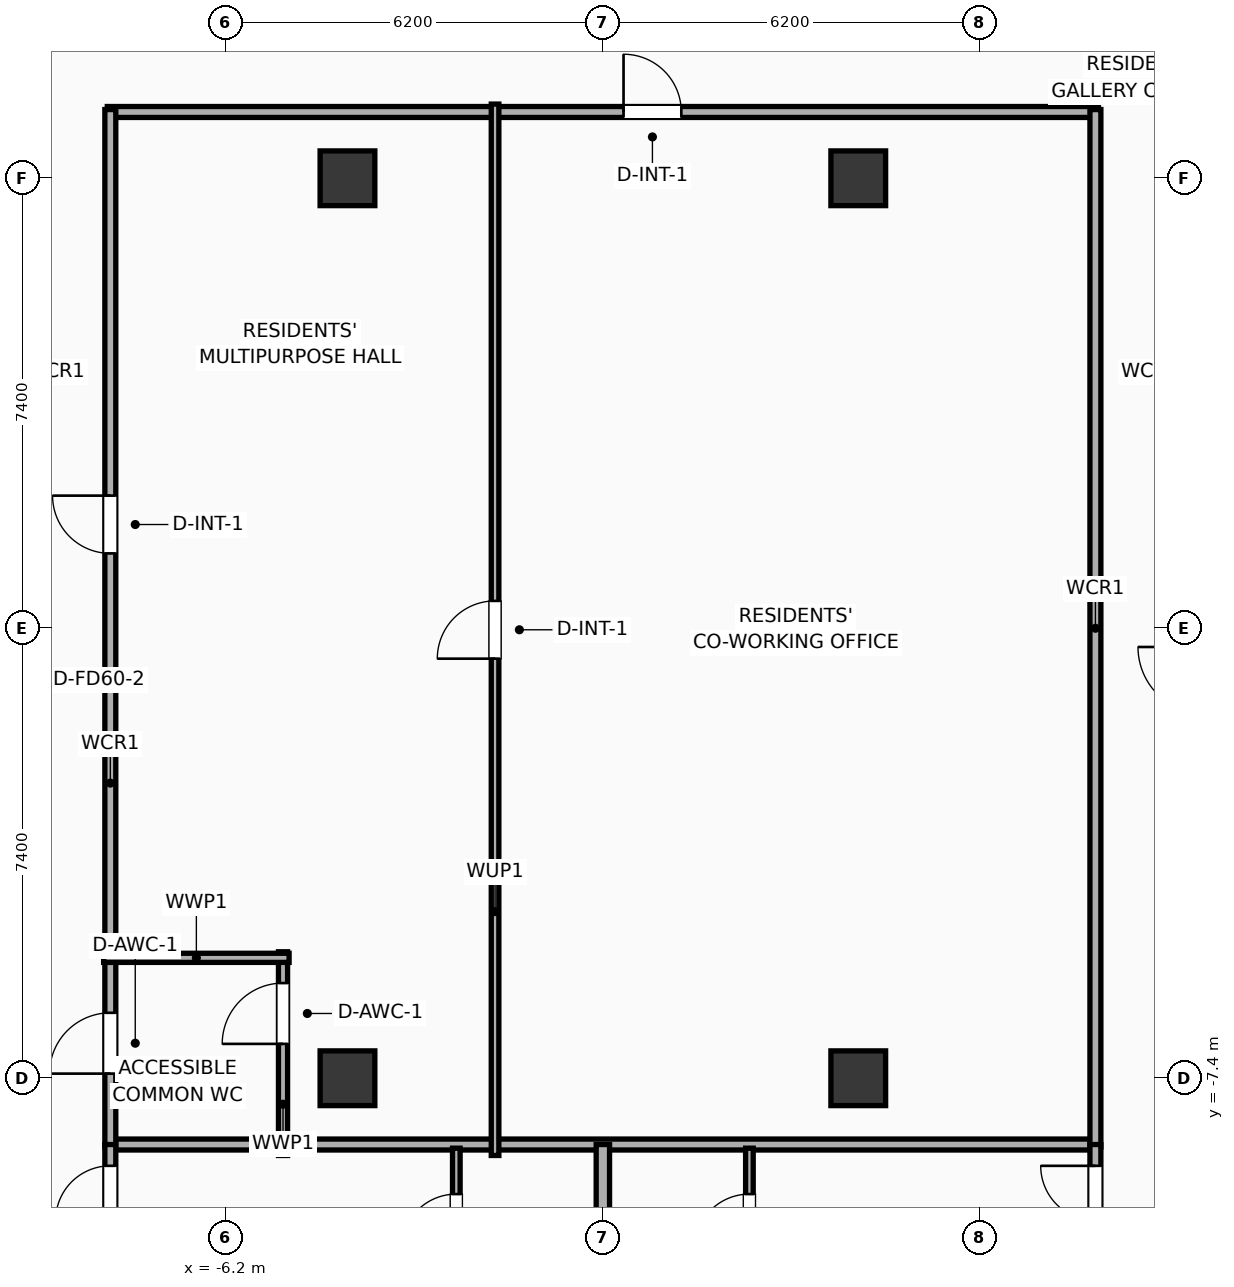
"""IFC4 building model, lengths in metres.
Left out: names, types, materials, properties, quantities, classifications, styles, units other than length and angle.
Written with IfcOpenShell. Run it as: python <this file> out.ifc"""

import sys

from ifc_helpers import new_model, si_unit, direction, frame, frame_2d, origin, origin_2d, place, context, subcontext, project, spatial, rectangle, extrude, element, fill, save


model = new_model("IFC4")
c1 = context("Model", 3, precision=1e-05, world=origin(), true_north=direction((0.0, 1.0)))
c2 = subcontext(c1, "Body", "Model", "MODEL_VIEW")
j1 = project(units=[si_unit("LENGTHUNIT", "METRE"), si_unit("PLANEANGLEUNIT", "RADIAN")], contexts=[c1])
p1 = place(None, origin())
s1 = spatial("IfcSite", under=j1, at=p1, CompositionType="ELEMENT")
p2 = place(p1, origin())
s2 = spatial("IfcBuilding", under=s1, at=p2, CompositionType="ELEMENT")
p3 = place(p2, frame((0.0, 0.0, 299.0)))
s3 = spatial("IfcBuildingStorey", under=s2, at=p3, CompositionType="ELEMENT", Elevation=299.0)
for number, where, z_axis, x_axis in (
    (1, (-4.2, -7.4, 0.0), (0.0, 0.0, 1.0), (1.0, 0.0, 0.0)),
    (2, (-4.2, 7.4, 0.0), (0.0, 0.0, 1.0), (1.0, 0.0, 0.0)),
    (3, (4.2, -7.4, 0.0), (0.0, 0.0, 1.0), (1.0, 0.0, 0.0)),
    (4, (4.2, 7.4, 0.0), (0.0, 0.0, 1.0), (1.0, 0.0, 0.0)),
):
    element("IfcColumn", number, at=place(p3, frame(where, z_axis=z_axis, x_axis=x_axis)), inside=s3, PredefinedType="COLUMN", context=c2, shape_type="SweptSolid", body=[
        extrude(rectangle(XDim=0.9, YDim=0.9, at=origin_2d()), origin(), (0.0, 0.0, 1.0), 3.9),
    ])
p4 = place(p3, frame((-8.15, 8.49, 0.0), z_axis=(0.0, 0.0, 1.0), x_axis=(1.0, 0.0, 0.0)))
e5 = element("IfcWall", 5, at=p4, inside=s3, PredefinedType="PARTITIONING", context=c2, shape_type="SweptSolid", body=[
    extrude(rectangle(XDim=16.3, YDim=0.18, at=frame_2d((8.15, 0.0))), origin(), (0.0, 0.0, 1.0), 3.635),
])
p5 = place(p4, frame((8.49, 0.0, 0.0)))
e6 = element("IfcOpeningElement", 6, at=p5, cuts=e5, PredefinedType="OPENING", context=c2, shape_type="SweptSolid", body=[
    extrude(rectangle(XDim=0.95, YDim=2.05, at=frame_2d((0.475, 1.025))), frame((0.0, 0.1, 0.0), z_axis=(0.0, -1.0, 0.0), x_axis=(1.0, 0.0, 0.0)), (0.0, 0.0, 1.0), 0.2),
])
p6 = place(p3, frame((-8.15, -8.49, 0.0), z_axis=(0.0, 0.0, 1.0), x_axis=(1.0, 0.0, 0.0)))
e7 = element("IfcWall", 7, at=p6, inside=s3, PredefinedType="PARTITIONING", context=c2, shape_type="SweptSolid", body=[
    extrude(rectangle(XDim=16.3, YDim=0.18, at=frame_2d((8.15, 0.0))), origin(), (0.0, 0.0, 1.0), 3.635),
])
p7 = place(p3, frame((-8.1, -8.53, 0.0), z_axis=(0.0, 0.0, 1.0), x_axis=(0.0, 1.0, 0.0)))
e8 = element("IfcWall", 8, at=p7, inside=s3, PredefinedType="PARTITIONING", context=c2, shape_type="SweptSolid", body=[
    extrude(rectangle(XDim=17.06, YDim=0.18, at=frame_2d((8.53, 0.0))), origin(), (0.0, 0.0, 1.0), 3.635),
])
p8 = place(p7, frame((1.206, 0.0, 0.0)))
e9 = element("IfcOpeningElement", 9, at=p8, cuts=e8, PredefinedType="OPENING", context=c2, shape_type="SweptSolid", body=[
    extrude(rectangle(XDim=1.0, YDim=2.05, at=frame_2d((0.5, 1.025))), frame((0.0, 0.1, 0.0), z_axis=(0.0, -1.0, 0.0), x_axis=(1.0, 0.0, 0.0)), (0.0, 0.0, 1.0), 0.2),
])
p9 = place(p7, frame((9.761, 0.0, 0.0)))
e10 = element("IfcOpeningElement", 10, at=p9, cuts=e8, PredefinedType="OPENING", context=c2, shape_type="SweptSolid", body=[
    extrude(rectangle(XDim=0.95, YDim=2.05, at=frame_2d((0.475, 1.025))), frame((0.0, 0.1, 0.0), z_axis=(0.0, -1.0, 0.0), x_axis=(1.0, 0.0, 0.0)), (0.0, 0.0, 1.0), 0.2),
])
p10 = place(p3, frame((8.1, -8.53, 0.0), z_axis=(0.0, 0.0, 1.0), x_axis=(0.0, 1.0, 0.0)))
e11 = element("IfcWall", 11, at=p10, inside=s3, PredefinedType="PARTITIONING", context=c2, shape_type="SweptSolid", body=[
    extrude(rectangle(XDim=17.06, YDim=0.18, at=frame_2d((8.53, 0.0))), origin(), (0.0, 0.0, 1.0), 3.635),
])
p11 = place(p3, frame((-5.26, -8.67, 0.0), z_axis=(0.0, 0.0, 1.0), x_axis=(0.0, 1.0, 0.0)))
e12 = element("IfcWall", 12, at=p11, inside=s3, PredefinedType="PLUMBINGWALL", context=c2, shape_type="SweptSolid", body=[
    extrude(rectangle(XDim=3.35, YDim=0.15, at=frame_2d((1.675, 0.0))), origin(), (0.0, 0.0, 1.0), 3.635),
])
p12 = place(p11, frame((1.835, 0.0, 0.0)))
e13 = element("IfcOpeningElement", 13, at=p12, cuts=e12, PredefinedType="OPENING", context=c2, shape_type="SweptSolid", body=[
    extrude(rectangle(XDim=1.0, YDim=2.05, at=frame_2d((0.5, 1.025))), frame((0.0, 0.085, 0.0), z_axis=(0.0, -1.0, 0.0), x_axis=(1.0, 0.0, 0.0)), (0.0, 0.0, 1.0), 0.17),
])
p13 = place(p3, frame((-8.21, -5.42, 0.0), z_axis=(0.0, 0.0, 1.0), x_axis=(1.0, 0.0, 0.0)))
e14 = element("IfcWall", 14, at=p13, inside=s3, PredefinedType="PLUMBINGWALL", context=c2, shape_type="SweptSolid", body=[
    extrude(rectangle(XDim=3.05, YDim=0.15, at=frame_2d((1.525, 0.0))), origin(), (0.0, 0.0, 1.0), 3.635),
])
p14 = place(p3, frame((-1.773, -8.67, 0.0), z_axis=(0.0, 0.0, 1.0), x_axis=(0.0, 1.0, 0.0)))
e15 = element("IfcWall", 15, at=p14, inside=s3, PredefinedType="PARTITIONING", context=c2, shape_type="SweptSolid", body=[
    extrude(rectangle(XDim=17.29, YDim=0.125, at=frame_2d((8.645, 0.0))), origin(), (0.0, 0.0, 1.0), 3.635),
])
p15 = place(p14, frame((8.17, 0.0, 0.0)))
e16 = element("IfcOpeningElement", 16, at=p15, cuts=e15, PredefinedType="OPENING", context=c2, shape_type="SweptSolid", body=[
    extrude(rectangle(XDim=0.95, YDim=2.05, at=frame_2d((0.475, 1.025))), frame((0.0, 0.073, 0.0), z_axis=(0.0, -1.0, 0.0), x_axis=(1.0, 0.0, 0.0)), (0.0, 0.0, 1.0), 0.145),
])
p16 = place(p3, frame((-2.41, -10.96, 0.0), z_axis=(0.0, 0.0, 1.0), x_axis=(0.0, 1.0, 0.0)))
e17 = element("IfcWall", 17, at=p16, inside=s3, PredefinedType="PARTITIONING", context=c2, shape_type="SweptSolid", body=[
    extrude(rectangle(XDim=2.41, YDim=0.125, at=frame_2d((1.205, 0.0))), origin(), (0.0, 0.0, 1.0), 3.635),
])
p17 = place(p16, frame((0.755, 0.0, 0.0)))
e18 = element("IfcOpeningElement", 18, at=p17, cuts=e17, PredefinedType="OPENING", context=c2, shape_type="SweptSolid", body=[
    extrude(rectangle(XDim=0.9, YDim=2.05, at=frame_2d((0.45, 1.025))), frame((0.0, 0.073, 0.0), z_axis=(0.0, -1.0, 0.0), x_axis=(1.0, 0.0, 0.0)), (0.0, 0.0, 1.0), 0.145),
])
p18 = place(p3, frame((-8.1, -18.155, 0.0), z_axis=(0.0, 0.0, 1.0), x_axis=(0.0, 1.0, 0.0)))
e19 = element("IfcWall", 19, at=p18, inside=s3, PredefinedType="PARTITIONING", context=c2, shape_type="SweptSolid", body=[
    extrude(rectangle(XDim=9.665, YDim=0.18, at=frame_2d((4.832, 0.0))), origin(), (0.0, 0.0, 1.0), 3.635),
])
p19 = place(p18, frame((8.414, 0.0, 0.0)))
e20 = element("IfcOpeningElement", 20, at=p19, cuts=e19, PredefinedType="OPENING", context=c2, shape_type="SweptSolid", body=[
    extrude(rectangle(XDim=0.9, YDim=2.05, at=frame_2d((0.45, 1.025))), frame((0.0, 0.1, 0.0), z_axis=(0.0, -1.0, 0.0), x_axis=(1.0, 0.0, 0.0)), (0.0, 0.0, 1.0), 0.2),
])
p20 = place(p3, frame((2.41, -10.96, 0.0), z_axis=(0.0, 0.0, 1.0), x_axis=(0.0, 1.0, 0.0)))
e21 = element("IfcWall", 21, at=p20, inside=s3, PredefinedType="PARTITIONING", context=c2, shape_type="SweptSolid", body=[
    extrude(rectangle(XDim=2.41, YDim=0.125, at=frame_2d((1.205, 0.0))), origin(), (0.0, 0.0, 1.0), 3.635),
])
p21 = place(p20, frame((0.755, 0.0, 0.0)))
e22 = element("IfcOpeningElement", 22, at=p21, cuts=e21, PredefinedType="OPENING", context=c2, shape_type="SweptSolid", body=[
    extrude(rectangle(XDim=0.9, YDim=2.05, at=frame_2d((0.45, 1.025))), frame((0.0, 0.073, 0.0), z_axis=(0.0, -1.0, 0.0), x_axis=(1.0, 0.0, 0.0)), (0.0, 0.0, 1.0), 0.145),
])
p22 = place(p3, frame((8.1, -19.857, 0.0), z_axis=(0.0, 0.0, 1.0), x_axis=(0.0, 1.0, 0.0)))
e23 = element("IfcWall", 23, at=p22, inside=s3, PredefinedType="PARTITIONING", context=c2, shape_type="SweptSolid", body=[
    extrude(rectangle(XDim=11.367, YDim=0.18, at=frame_2d((5.684, 0.0))), origin(), (0.0, 0.0, 1.0), 3.635),
])
p23 = place(p22, frame((10.117, 0.0, 0.0)))
e24 = element("IfcOpeningElement", 24, at=p23, cuts=e23, PredefinedType="OPENING", context=c2, shape_type="SweptSolid", body=[
    extrude(rectangle(XDim=0.9, YDim=2.05, at=frame_2d((0.45, 1.025))), frame((0.0, 0.1, 0.0), z_axis=(0.0, -1.0, 0.0), x_axis=(1.0, 0.0, 0.0)), (0.0, 0.0, 1.0), 0.2),
])
p24 = place(p3, frame((0.0, -19.006, 0.0), z_axis=(0.0, 0.0, 1.0), x_axis=(0.0, 1.0, 0.0)))
e25 = element("IfcWall", 25, at=p24, inside=s3, PredefinedType="PARTITIONING", context=c2, shape_type="SweptSolid", body=[
    extrude(rectangle(XDim=10.516, YDim=0.22, at=frame_2d((5.258, 0.0))), origin(), (0.0, 0.0, 1.0), 3.635),
])
p25 = place(p5, origin())
e26 = element("IfcDoor", 26, at=p25, inside=s3, OperationType="SINGLE_SWING_LEFT", PredefinedType="DOOR", context=c2, shape_type="SweptSolid", body=[
    extrude(rectangle(XDim=0.95, YDim=2.05, at=frame_2d((0.475, 1.025))), frame((0.0, 0.025, 0.0), z_axis=(0.0, -1.0, 0.0), x_axis=(1.0, 0.0, 0.0)), (0.0, 0.0, 1.0), 0.05),
])
fill(e6, e26)
p26 = place(p8, origin())
e27 = element("IfcDoor", 27, at=p26, inside=s3, OperationType="SINGLE_SWING_LEFT", PredefinedType="DOOR", context=c2, shape_type="SweptSolid", body=[
    extrude(rectangle(XDim=1.0, YDim=2.05, at=frame_2d((0.5, 1.025))), frame((0.0, 0.025, 0.0), z_axis=(0.0, -1.0, 0.0), x_axis=(1.0, 0.0, 0.0)), (0.0, 0.0, 1.0), 0.05),
])
fill(e9, e27)
p27 = place(p9, origin())
e28 = element("IfcDoor", 28, at=p27, inside=s3, OperationType="SINGLE_SWING_RIGHT", PredefinedType="DOOR", context=c2, shape_type="SweptSolid", body=[
    extrude(rectangle(XDim=0.95, YDim=2.05, at=frame_2d((0.475, 1.025))), frame((0.0, 0.025, 0.0), z_axis=(0.0, -1.0, 0.0), x_axis=(1.0, 0.0, 0.0)), (0.0, 0.0, 1.0), 0.05),
])
fill(e10, e28)
p28 = place(p12, origin())
e29 = element("IfcDoor", 29, at=p28, inside=s3, OperationType="SINGLE_SWING_LEFT", PredefinedType="DOOR", context=c2, shape_type="SweptSolid", body=[
    extrude(rectangle(XDim=1.0, YDim=2.05, at=frame_2d((0.5, 1.025))), frame((0.0, 0.025, 0.0), z_axis=(0.0, -1.0, 0.0), x_axis=(1.0, 0.0, 0.0)), (0.0, 0.0, 1.0), 0.05),
])
fill(e13, e29)
p29 = place(p15, origin())
e30 = element("IfcDoor", 30, at=p29, inside=s3, OperationType="SINGLE_SWING_LEFT", PredefinedType="DOOR", context=c2, shape_type="SweptSolid", body=[
    extrude(rectangle(XDim=0.95, YDim=2.05, at=frame_2d((0.475, 1.025))), frame((0.0, 0.025, 0.0), z_axis=(0.0, -1.0, 0.0), x_axis=(1.0, 0.0, 0.0)), (0.0, 0.0, 1.0), 0.05),
])
fill(e16, e30)
p30 = place(p17, origin())
e31 = element("IfcDoor", 31, at=p30, inside=s3, OperationType="SINGLE_SWING_LEFT", PredefinedType="DOOR", context=c2, shape_type="SweptSolid", body=[
    extrude(rectangle(XDim=0.9, YDim=2.05, at=frame_2d((0.45, 1.025))), frame((0.0, 0.025, 0.0), z_axis=(0.0, -1.0, 0.0), x_axis=(1.0, 0.0, 0.0)), (0.0, 0.0, 1.0), 0.05),
])
fill(e18, e31)
p31 = place(p19, origin())
e32 = element("IfcDoor", 32, at=p31, inside=s3, OperationType="SINGLE_SWING_LEFT", PredefinedType="DOOR", context=c2, shape_type="SweptSolid", body=[
    extrude(rectangle(XDim=0.9, YDim=2.05, at=frame_2d((0.45, 1.025))), frame((0.0, 0.025, 0.0), z_axis=(0.0, -1.0, 0.0), x_axis=(1.0, 0.0, 0.0)), (0.0, 0.0, 1.0), 0.05),
])
fill(e20, e32)
p32 = place(p21, origin())
e33 = element("IfcDoor", 33, at=p32, inside=s3, OperationType="SINGLE_SWING_LEFT", PredefinedType="DOOR", context=c2, shape_type="SweptSolid", body=[
    extrude(rectangle(XDim=0.9, YDim=2.05, at=frame_2d((0.45, 1.025))), frame((0.0, 0.025, 0.0), z_axis=(0.0, -1.0, 0.0), x_axis=(1.0, 0.0, 0.0)), (0.0, 0.0, 1.0), 0.05),
])
fill(e22, e33)
p33 = place(p23, origin())
e34 = element("IfcDoor", 34, at=p33, inside=s3, OperationType="SINGLE_SWING_RIGHT", PredefinedType="DOOR", context=c2, shape_type="SweptSolid", body=[
    extrude(rectangle(XDim=0.9, YDim=2.05, at=frame_2d((0.45, 1.025))), frame((0.0, 0.025, 0.0), z_axis=(0.0, -1.0, 0.0), x_axis=(1.0, 0.0, 0.0)), (0.0, 0.0, 1.0), 0.05),
])
fill(e24, e34)
save(model, sys.argv[1])
